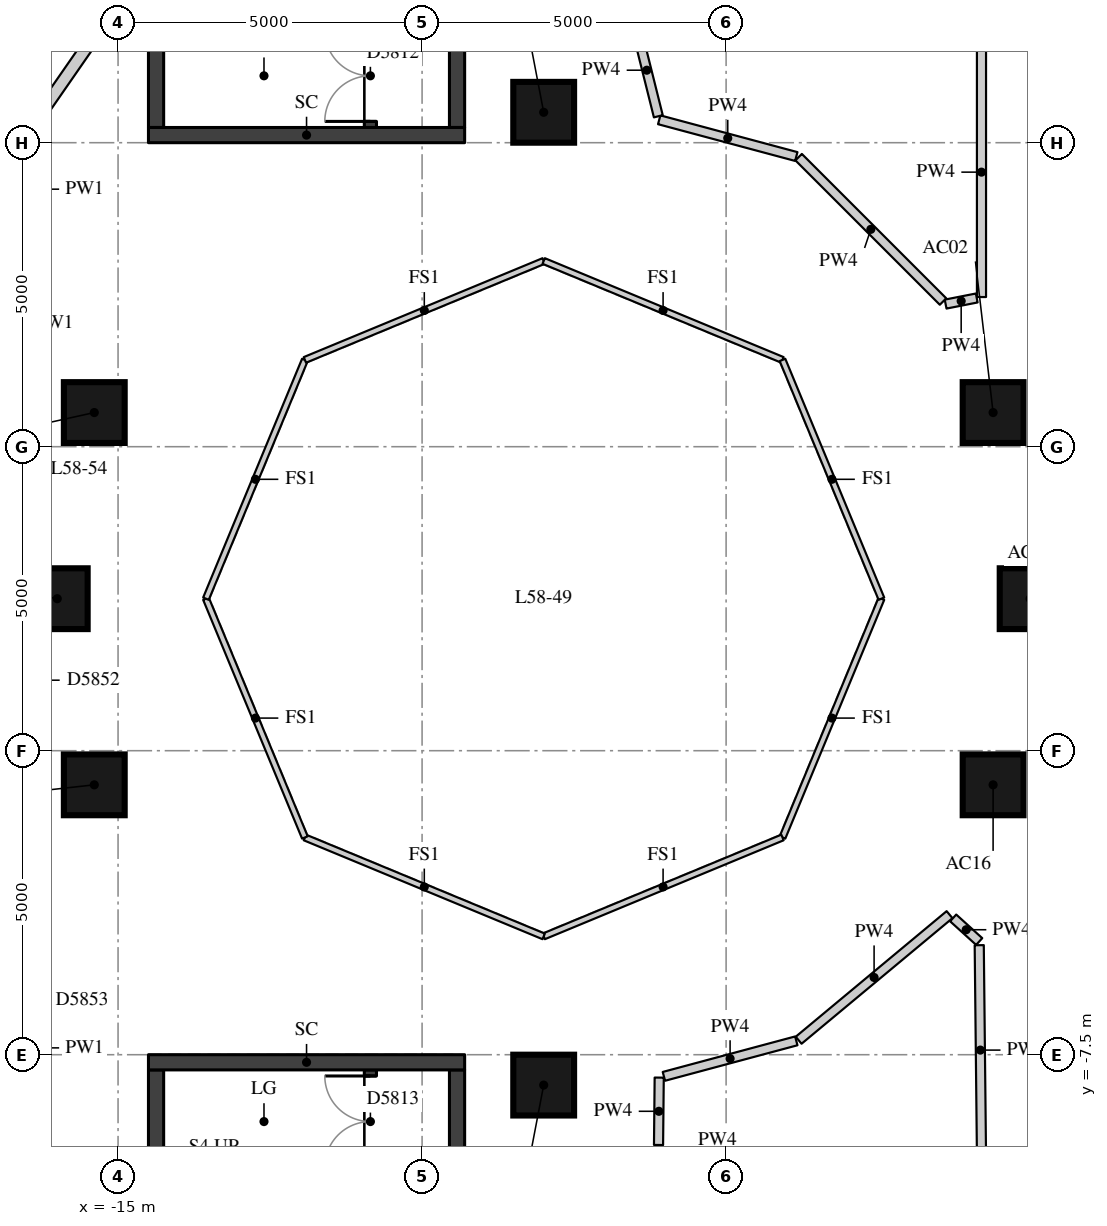
"""IFC4 building model, lengths in metres.
Left out: names, types, materials, properties, quantities, classifications, styles, units other than length and angle.
Written with IfcOpenShell. Run it as: python <this file> out.ifc"""

import sys

from ifc_helpers import new_model, si_unit, direction, frame, frame_2d, origin, origin_2d, place, context, subcontext, project, spatial, rectangle, extrude, element, fill, save


model = new_model("IFC4")
c1 = context("Model", 3, precision=1e-05, world=origin(), true_north=direction((0.0, 1.0)))
c2 = subcontext(c1, "Body", "Model", "MODEL_VIEW")
j1 = project(units=[si_unit("LENGTHUNIT", "METRE"), si_unit("PLANEANGLEUNIT", "RADIAN")], contexts=[c1])
p1 = place(None, origin())
s1 = spatial("IfcSite", under=j1, at=p1, CompositionType="ELEMENT")
p2 = place(p1, origin())
s2 = spatial("IfcBuilding", under=s1, at=p2, CompositionType="ELEMENT")
p3 = place(p2, frame((0.0, 0.0, 205.7)))
s3 = spatial("IfcBuildingStorey", under=s2, at=p3, CompositionType="ELEMENT", Elevation=205.7)
for number, where, z_axis, x_axis in (
    (1, (0.0, 0.0, 0.0), (0.0, 0.0, 1.0), (1.0, 0.0, 0.0)),
    (2, (-0.609, 3.062, 0.0), (0.0, 0.0, 1.0), (1.0, 0.0, 0.0)),
    (3, (-8.0, 8.0, 0.0), (0.0, 0.0, 1.0), (1.0, 0.0, 0.0)),
    (4, (-15.391, 3.062, 0.0), (0.0, 0.0, 1.0), (1.0, 0.0, 0.0)),
    (5, (-16.0, 0.0, 0.0), (0.0, 0.0, 1.0), (1.0, 0.0, 0.0)),
    (6, (-15.391, -3.062, 0.0), (0.0, 0.0, 1.0), (1.0, 0.0, 0.0)),
    (7, (-8.0, -8.0, 0.0), (0.0, 0.0, 1.0), (1.0, 0.0, 0.0)),
    (8, (-0.609, -3.062, 0.0), (0.0, 0.0, 1.0), (1.0, 0.0, 0.0)),
):
    element("IfcColumn", number, at=place(p3, frame(where, z_axis=z_axis, x_axis=x_axis)), inside=s3, PredefinedType="COLUMN", context=c2, shape_type="SweptSolid", body=[
        extrude(rectangle(XDim=1.0, YDim=1.0, at=origin_2d()), origin(), (0.0, 0.0, 1.0), 3.3),
    ])
p4 = place(p3, frame((-10.85, 7.75, 0.0), z_axis=(0.0, 0.0, 1.0), x_axis=(0.0, 1.0, 0.0)))
e9 = element("IfcWall", 9, at=p4, inside=s3, PredefinedType="SHEAR", context=c2, shape_type="SweptSolid", body=[
    extrude(rectangle(XDim=6.0, YDim=0.2, at=frame_2d((3.0, 0.0))), origin(), (0.0, 0.0, 1.0), 3.02),
])
p5 = place(p4, frame((0.1, 0.0, 0.0)))
e10 = element("IfcOpeningElement", 10, at=p5, cuts=e9, PredefinedType="OPENING", context=c2, shape_type="SweptSolid", body=[
    extrude(rectangle(XDim=1.5, YDim=2.1, at=frame_2d((0.75, 1.05))), frame((0.0, 0.11, 0.0), z_axis=(0.0, -1.0, 0.0), x_axis=(1.0, 0.0, 0.0)), (0.0, 0.0, 1.0), 0.22),
])
p6 = place(p3, frame((-10.85, -13.75, 0.0), z_axis=(0.0, 0.0, 1.0), x_axis=(0.0, 1.0, 0.0)))
e11 = element("IfcWall", 11, at=p6, inside=s3, PredefinedType="SHEAR", context=c2, shape_type="SweptSolid", body=[
    extrude(rectangle(XDim=6.0, YDim=0.2, at=frame_2d((3.0, 0.0))), origin(), (0.0, 0.0, 1.0), 3.02),
])
p7 = place(p6, frame((4.4, 0.0, 0.0)))
e12 = element("IfcOpeningElement", 12, at=p7, cuts=e11, PredefinedType="OPENING", context=c2, shape_type="SweptSolid", body=[
    extrude(rectangle(XDim=1.5, YDim=2.1, at=frame_2d((0.75, 1.05))), frame((0.0, 0.11, 0.0), z_axis=(0.0, -1.0, 0.0), x_axis=(1.0, 0.0, 0.0)), (0.0, 0.0, 1.0), 0.22),
])
p8 = place(p3, frame((-14.375, 7.75, -0.28), z_axis=(0.0, 0.0, 1.0), x_axis=(0.0, 1.0, 0.0)))
e13 = element("IfcWall", 13, at=p8, inside=s3, PredefinedType="SHEAR", context=c2, shape_type="SweptSolid", body=[
    extrude(rectangle(XDim=6.0, YDim=0.25, at=frame_2d((3.0, 0.0))), origin(), (0.0, 0.0, 1.0), 3.3),
])
p9 = place(p3, frame((-9.425, 7.75, -0.28), z_axis=(0.0, 0.0, 1.0), x_axis=(0.0, 1.0, 0.0)))
e14 = element("IfcWall", 14, at=p9, inside=s3, PredefinedType="SHEAR", context=c2, shape_type="SweptSolid", body=[
    extrude(rectangle(XDim=6.0, YDim=0.25, at=frame_2d((3.0, 0.0))), origin(), (0.0, 0.0, 1.0), 3.3),
])
p10 = place(p9, frame((2.1, 0.0, 0.28)))
e15 = element("IfcOpeningElement", 15, at=p10, cuts=e14, PredefinedType="OPENING", context=c2, shape_type="SweptSolid", body=[
    extrude(rectangle(XDim=1.5, YDim=2.1, at=frame_2d((0.75, 1.05))), frame((0.0, 0.135, 0.0), z_axis=(0.0, -1.0, 0.0), x_axis=(1.0, 0.0, 0.0)), (0.0, 0.0, 1.0), 0.27),
])
p11 = place(p3, frame((-14.5, 7.625, -0.28), z_axis=(0.0, 0.0, 1.0), x_axis=(1.0, 0.0, 0.0)))
e16 = element("IfcWall", 16, at=p11, inside=s3, PredefinedType="SHEAR", context=c2, shape_type="SweptSolid", body=[
    extrude(rectangle(XDim=5.2, YDim=0.25, at=frame_2d((2.6, 0.0))), origin(), (0.0, 0.0, 1.0), 3.3),
])
p12 = place(p3, frame((-14.375, -13.75, -0.28), z_axis=(0.0, 0.0, 1.0), x_axis=(0.0, 1.0, 0.0)))
e17 = element("IfcWall", 17, at=p12, inside=s3, PredefinedType="SHEAR", context=c2, shape_type="SweptSolid", body=[
    extrude(rectangle(XDim=6.0, YDim=0.25, at=frame_2d((3.0, 0.0))), origin(), (0.0, 0.0, 1.0), 3.3),
])
p13 = place(p3, frame((-9.425, -13.75, -0.28), z_axis=(0.0, 0.0, 1.0), x_axis=(0.0, 1.0, 0.0)))
e18 = element("IfcWall", 18, at=p13, inside=s3, PredefinedType="SHEAR", context=c2, shape_type="SweptSolid", body=[
    extrude(rectangle(XDim=6.0, YDim=0.25, at=frame_2d((3.0, 0.0))), origin(), (0.0, 0.0, 1.0), 3.3),
])
p14 = place(p13, frame((2.4, 0.0, 0.28)))
e19 = element("IfcOpeningElement", 19, at=p14, cuts=e18, PredefinedType="OPENING", context=c2, shape_type="SweptSolid", body=[
    extrude(rectangle(XDim=1.5, YDim=2.1, at=frame_2d((0.75, 1.05))), frame((0.0, 0.135, 0.0), z_axis=(0.0, -1.0, 0.0), x_axis=(1.0, 0.0, 0.0)), (0.0, 0.0, 1.0), 0.27),
])
p15 = place(p3, frame((-14.5, -7.625, -0.28), z_axis=(0.0, 0.0, 1.0), x_axis=(1.0, 0.0, 0.0)))
e20 = element("IfcWall", 20, at=p15, inside=s3, PredefinedType="SHEAR", context=c2, shape_type="SweptSolid", body=[
    extrude(rectangle(XDim=5.2, YDim=0.25, at=frame_2d((2.6, 0.0))), origin(), (0.0, 0.0, 1.0), 3.3),
])
p16 = place(p3, frame((-16.266, 7.989, 0.0), z_axis=(0.0, 0.0, 1.0), x_axis=(0.569860411146, 0.821741511552, 0.0)))
e21 = element("IfcWall", 21, at=p16, inside=s3, PredefinedType="PARTITIONING", context=c2, shape_type="SweptSolid", body=[
    extrude(rectangle(XDim=2.966, YDim=0.2, at=frame_2d((1.483, 0.0))), origin(), (0.0, 0.0, 1.0), 3.02),
])
p17 = place(p3, frame((-0.8, 9.07, 0.0), z_axis=(0.0, 0.0, 1.0), x_axis=(0.0, -1.0, 0.0)))
e22 = element("IfcWall", 22, at=p17, inside=s3, PredefinedType="PARTITIONING", context=c2, shape_type="SweptSolid", body=[
    extrude(rectangle(XDim=4.108, YDim=0.15, at=frame_2d((2.054, 0.0))), origin(), (0.0, 0.0, 1.0), 3.02),
])
p18 = place(p3, frame((-0.878, 4.946, 0.0), z_axis=(0.0, 0.0, 1.0), x_axis=(-0.981223514921, -0.192874087857, 0.0)))
e23 = element("IfcWall", 23, at=p18, inside=s3, PredefinedType="PARTITIONING", context=c2, shape_type="SweptSolid", body=[
    extrude(rectangle(XDim=0.521, YDim=0.15, at=frame_2d((0.261, 0.0))), origin(), (0.0, 0.0, 1.0), 3.02),
])
p19 = place(p3, frame((-1.432, 4.888, 0.0), z_axis=(0.0, 0.0, 1.0), x_axis=(-0.70714312975, 0.707070430754, 0.0)))
e24 = element("IfcWall", 24, at=p19, inside=s3, PredefinedType="PARTITIONING", context=c2, shape_type="SweptSolid", body=[
    extrude(rectangle(XDim=3.358, YDim=0.15, at=frame_2d((1.679, 0.0))), origin(), (0.0, 0.0, 1.0), 3.02),
])
p20 = place(p3, frame((-3.846, 7.272, 0.0), z_axis=(0.0, 0.0, 1.0), x_axis=(-0.965906023197, 0.258892939941, 0.0)))
e25 = element("IfcWall", 25, at=p20, inside=s3, PredefinedType="PARTITIONING", context=c2, shape_type="SweptSolid", body=[
    extrude(rectangle(XDim=2.334, YDim=0.15, at=frame_2d((1.167, 0.0))), origin(), (0.0, 0.0, 1.0), 3.02),
])
p21 = place(p3, frame((-6.115, 7.935, 0.0), z_axis=(0.0, 0.0, 1.0), x_axis=(-0.242425292239, 0.970170076679, 0.0)))
e26 = element("IfcWall", 26, at=p21, inside=s3, PredefinedType="PARTITIONING", context=c2, shape_type="SweptSolid", body=[
    extrude(rectangle(XDim=1.562, YDim=0.15, at=frame_2d((0.781, 0.0))), origin(), (0.0, 0.0, 1.0), 3.02),
])
p22 = place(p3, frame((-3.807, -7.262, 0.0), z_axis=(0.0, 0.0, 1.0), x_axis=(0.768654933145, 0.639663656739, 0.0)))
e27 = element("IfcWall", 27, at=p22, inside=s3, PredefinedType="PARTITIONING", context=c2, shape_type="SweptSolid", body=[
    extrude(rectangle(XDim=3.229, YDim=0.15, at=frame_2d((1.615, 0.0))), origin(), (0.0, 0.0, 1.0), 3.02),
])
p23 = place(p3, frame((-1.266, -5.25, 0.0), z_axis=(0.0, 0.0, 1.0), x_axis=(0.740704364941, -0.671831112525, 0.0)))
e28 = element("IfcWall", 28, at=p23, inside=s3, PredefinedType="PARTITIONING", context=c2, shape_type="SweptSolid", body=[
    extrude(rectangle(XDim=0.578, YDim=0.15, at=frame_2d((0.289, 0.0))), origin(), (0.0, 0.0, 1.0), 3.02),
])
p24 = place(p3, frame((-0.837, -5.699, 0.0), z_axis=(0.0, 0.0, 1.0), x_axis=(0.010681337428, -0.999942952888, 0.0)))
e29 = element("IfcWall", 29, at=p24, inside=s3, PredefinedType="PARTITIONING", context=c2, shape_type="SweptSolid", body=[
    extrude(rectangle(XDim=3.451, YDim=0.15, at=frame_2d((1.726, 0.0))), origin(), (0.0, 0.0, 1.0), 3.02),
])
p25 = place(p3, frame((-5.736, -9.385, 0.0), z_axis=(0.0, 0.0, 1.0), x_axis=(-0.740919573429, 0.671593765389, 0.0)))
e30 = element("IfcWall", 30, at=p25, inside=s3, PredefinedType="PARTITIONING", context=c2, shape_type="SweptSolid", body=[
    extrude(rectangle(XDim=0.507, YDim=0.15, at=frame_2d((0.253, 0.0))), origin(), (0.0, 0.0, 1.0), 3.02),
])
p26 = place(p3, frame((-6.111, -8.985, 0.0), z_axis=(0.0, 0.0, 1.0), x_axis=(0.010133870444, 0.999948651017, 0.0)))
e31 = element("IfcWall", 31, at=p26, inside=s3, PredefinedType="PARTITIONING", context=c2, shape_type="SweptSolid", body=[
    extrude(rectangle(XDim=1.108, YDim=0.15, at=frame_2d((0.554, 0.0))), origin(), (0.0, 0.0, 1.0), 3.02),
])
p27 = place(p3, frame((-6.023, -7.856, 0.0), z_axis=(0.0, 0.0, 1.0), x_axis=(0.965887119847, 0.25896345633, 0.0)))
e32 = element("IfcWall", 32, at=p27, inside=s3, PredefinedType="PARTITIONING", context=c2, shape_type="SweptSolid", body=[
    extrude(rectangle(XDim=2.254, YDim=0.15, at=frame_2d((1.127, 0.0))), origin(), (0.0, 0.0, 1.0), 3.02),
])
for number, where, z_axis, x_axis in (
    (33, (-2.446, 0.0, 0.0), (0.0, 0.0, 1.0), (-0.383, -0.924, 0.0)),
    (34, (-4.073, -3.927, 0.0), (0.0, 0.0, 1.0), (-0.924, -0.383, 0.0)),
    (35, (-8.0, -5.554, 0.0), (0.0, 0.0, 1.0), (-0.924, 0.383, 0.0)),
    (36, (-11.927, -3.927, 0.0), (0.0, 0.0, 1.0), (-0.383, 0.924, 0.0)),
    (37, (-13.554, 0.0, 0.0), (0.0, 0.0, 1.0), (0.383, 0.924, 0.0)),
    (38, (-11.927, 3.927, 0.0), (0.0, 0.0, 1.0), (0.924, 0.383, 0.0)),
    (39, (-8.0, 5.554, 0.0), (0.0, 0.0, 1.0), (0.924, -0.383, 0.0)),
    (40, (-4.073, 3.927, 0.0), (0.0, 0.0, 1.0), (0.383, -0.924, 0.0)),
):
    element("IfcWall", number, at=place(p3, frame(where, z_axis=z_axis, x_axis=x_axis)), inside=s3, PredefinedType="PARTITIONING", context=c2, shape_type="SweptSolid", body=[
        extrude(rectangle(XDim=4.251, YDim=0.1, at=frame_2d((2.125, 0.0))), origin(), (0.0, 0.0, 1.0), 3.02),
    ])
p28 = place(p5, origin())
e41 = element("IfcDoor", 41, at=p28, inside=s3, OperationType="DOUBLE_DOOR_SINGLE_SWING", PredefinedType="DOOR", context=c2, shape_type="SweptSolid", body=[
    extrude(rectangle(XDim=1.5, YDim=2.1, at=frame_2d((0.75, 1.05))), frame((0.0, 0.025, 0.0), z_axis=(0.0, -1.0, 0.0), x_axis=(1.0, 0.0, 0.0)), (0.0, 0.0, 1.0), 0.05),
])
fill(e10, e41)
p29 = place(p7, origin())
e42 = element("IfcDoor", 42, at=p29, inside=s3, OperationType="DOUBLE_DOOR_SINGLE_SWING", PredefinedType="DOOR", context=c2, shape_type="SweptSolid", body=[
    extrude(rectangle(XDim=1.5, YDim=2.1, at=frame_2d((0.75, 1.05))), frame((0.0, 0.025, 0.0), z_axis=(0.0, -1.0, 0.0), x_axis=(1.0, 0.0, 0.0)), (0.0, 0.0, 1.0), 0.05),
])
fill(e12, e42)
save(model, sys.argv[1])
